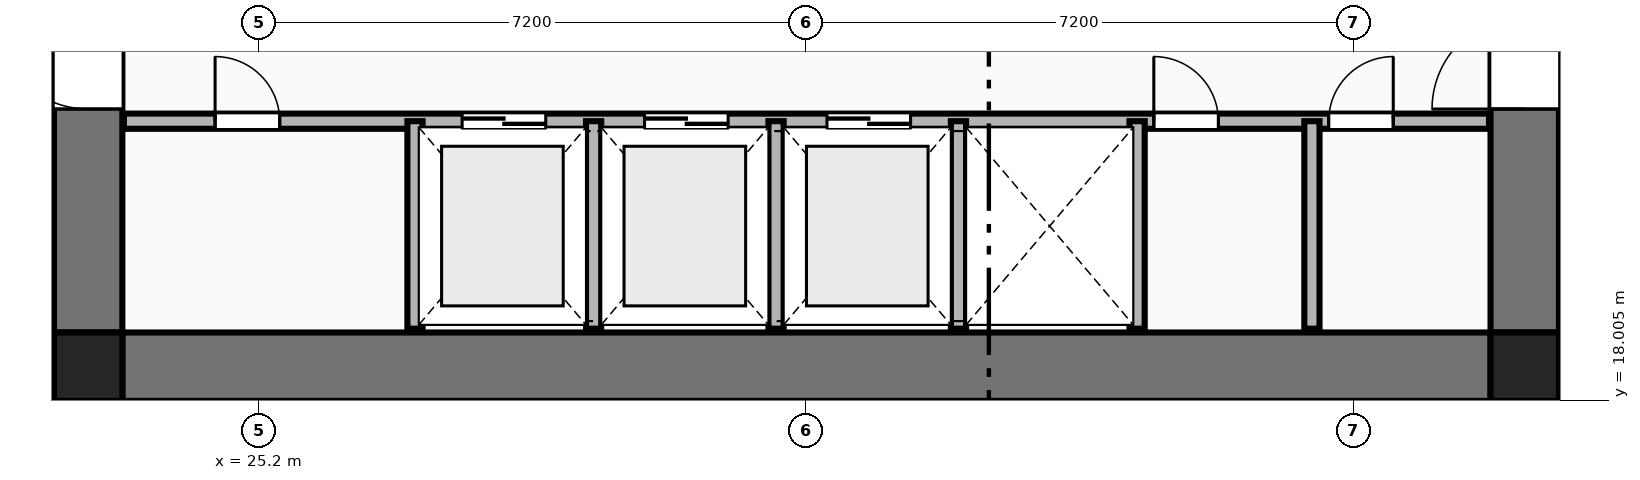
"""IFC4 building model, lengths in metres.
Left out: names, types, materials, properties, quantities, classifications, styles, units other than length and angle.
Written with IfcOpenShell. Run it as: python <this file> out.ifc"""

import sys

from ifc_helpers import new_model, si_unit, direction, frame, frame_2d, origin, origin_2d, place, context, subcontext, project, spatial, rectangle, extrude, element, fill, save


model = new_model("IFC4")
c1 = context("Model", 3, precision=1e-05, world=origin(), true_north=direction((0.0, 1.0)))
c2 = subcontext(c1, "Body", "Model", "MODEL_VIEW")
j1 = project(units=[si_unit("LENGTHUNIT", "METRE"), si_unit("PLANEANGLEUNIT", "RADIAN")], contexts=[c1])
p1 = place(None, origin())
s1 = spatial("IfcSite", under=j1, at=p1, CompositionType="ELEMENT")
p2 = place(p1, origin())
s2 = spatial("IfcBuilding", under=s1, at=p2, CompositionType="ELEMENT")
p3 = place(p2, frame((0.0, 0.0, 28.45)))
s3 = spatial("IfcBuildingStorey", under=s2, at=p3, CompositionType="ELEMENT", Elevation=28.45)
for number, where, z_axis, x_axis in (
    (1, (22.95, 18.45, 0.0), (0.0, 0.0, 1.0), (1.0, 0.0, 0.0)),
    (2, (41.85, 18.45, 0.0), (0.0, 0.0, 1.0), (1.0, 0.0, 0.0)),
):
    element("IfcColumn", number, at=place(p3, frame(where, z_axis=z_axis, x_axis=x_axis)), inside=s3, PredefinedType="COLUMN", context=c2, shape_type="SweptSolid", body=[
        extrude(rectangle(XDim=0.9, YDim=0.9, at=origin_2d()), origin(), (0.0, 0.0, 1.0), 3.55),
    ])
p4 = place(p3, frame((23.4, 18.45, 0.0), z_axis=(0.0, 0.0, 1.0), x_axis=(1.0, 0.0, 0.0)))
e3 = element("IfcWall", 3, at=p4, inside=s3, PredefinedType="SHEAR", context=c2, shape_type="SweptSolid", body=[
    extrude(rectangle(XDim=18.0, YDim=0.9, at=frame_2d((9.0, 0.0))), origin(), (0.0, 0.0, 1.0), 3.33),
])
p5 = place(p3, frame((22.95, 18.9, 0.0), z_axis=(0.0, 0.0, 1.0), x_axis=(0.0, 1.0, 0.0)))
e4 = element("IfcWall", 4, at=p5, inside=s3, PredefinedType="SHEAR", context=c2, shape_type="SweptSolid", body=[
    extrude(rectangle(XDim=14.0, YDim=0.9, at=frame_2d((7.0, 0.0))), origin(), (0.0, 0.0, 1.0), 3.33),
])
p6 = place(p5, frame((2.94, 0.0, 0.0)))
e5 = element("IfcOpeningElement", 5, at=p6, cuts=e4, PredefinedType="OPENING", context=c2, shape_type="SweptSolid", body=[
    extrude(rectangle(XDim=1.22, YDim=2.25, at=frame_2d((0.61, 1.125))), frame((0.0, 0.46, 0.0), z_axis=(0.0, -1.0, 0.0), x_axis=(1.0, 0.0, 0.0)), (0.0, 0.0, 1.0), 0.92),
])
p7 = place(p3, frame((41.85, 18.9, 0.0), z_axis=(0.0, 0.0, 1.0), x_axis=(0.0, 1.0, 0.0)))
e6 = element("IfcWall", 6, at=p7, inside=s3, PredefinedType="SHEAR", context=c2, shape_type="SweptSolid", body=[
    extrude(rectangle(XDim=14.0, YDim=0.9, at=frame_2d((7.0, 0.0))), origin(), (0.0, 0.0, 1.0), 3.33),
])
p8 = place(p7, frame((2.94, 0.0, 0.0)))
e7 = element("IfcOpeningElement", 7, at=p8, cuts=e6, PredefinedType="OPENING", context=c2, shape_type="SweptSolid", body=[
    extrude(rectangle(XDim=1.22, YDim=2.25, at=frame_2d((0.61, 1.125))), frame((0.0, 0.46, 0.0), z_axis=(0.0, -1.0, 0.0), x_axis=(1.0, 0.0, 0.0)), (0.0, 0.0, 1.0), 0.92),
])
p9 = place(p3, frame((23.42, 21.68, 0.0), z_axis=(0.0, 0.0, 1.0), x_axis=(1.0, 0.0, 0.0)))
e8 = element("IfcWall", 8, at=p9, inside=s3, PredefinedType="PLUMBINGWALL", context=c2, shape_type="SweptSolid", body=[
    extrude(rectangle(XDim=17.96, YDim=0.2, at=frame_2d((8.98, 0.0))), origin(), (0.0, 0.0, 1.0), 3.33),
])
p10 = place(p9, frame((4.45, 0.0, 0.0)))
e9 = element("IfcOpeningElement", 9, at=p10, cuts=e8, PredefinedType="OPENING", context=c2, shape_type="SweptSolid", body=[
    extrude(rectangle(XDim=1.1, YDim=2.2, at=frame_2d((0.55, 1.1))), frame((0.0, 0.11, 0.0), z_axis=(0.0, -1.0, 0.0), x_axis=(1.0, 0.0, 0.0)), (0.0, 0.0, 1.0), 0.22),
])
p11 = place(p9, frame((6.85, 0.0, 0.0)))
e10 = element("IfcOpeningElement", 10, at=p11, cuts=e8, PredefinedType="OPENING", context=c2, shape_type="SweptSolid", body=[
    extrude(rectangle(XDim=1.1, YDim=2.2, at=frame_2d((0.55, 1.1))), frame((0.0, 0.11, 0.0), z_axis=(0.0, -1.0, 0.0), x_axis=(1.0, 0.0, 0.0)), (0.0, 0.0, 1.0), 0.22),
])
p12 = place(p9, frame((9.25, 0.0, 0.0)))
e11 = element("IfcOpeningElement", 11, at=p12, cuts=e8, PredefinedType="OPENING", context=c2, shape_type="SweptSolid", body=[
    extrude(rectangle(XDim=1.1, YDim=2.2, at=frame_2d((0.55, 1.1))), frame((0.0, 0.11, 0.0), z_axis=(0.0, -1.0, 0.0), x_axis=(1.0, 0.0, 0.0)), (0.0, 0.0, 1.0), 0.22),
])
p13 = place(p9, frame((1.2, 0.0, 0.0)))
e12 = element("IfcOpeningElement", 12, at=p13, cuts=e8, PredefinedType="OPENING", context=c2, shape_type="SweptSolid", body=[
    extrude(rectangle(XDim=0.85, YDim=2.05, at=frame_2d((0.425, 1.025))), frame((0.0, 0.11, 0.0), z_axis=(0.0, -1.0, 0.0), x_axis=(1.0, 0.0, 0.0)), (0.0, 0.0, 1.0), 0.22),
])
p14 = place(p9, frame((13.55, 0.0, 0.0)))
e13 = element("IfcOpeningElement", 13, at=p14, cuts=e8, PredefinedType="OPENING", context=c2, shape_type="SweptSolid", body=[
    extrude(rectangle(XDim=0.85, YDim=2.05, at=frame_2d((0.425, 1.025))), frame((0.0, 0.11, 0.0), z_axis=(0.0, -1.0, 0.0), x_axis=(1.0, 0.0, 0.0)), (0.0, 0.0, 1.0), 0.22),
])
p15 = place(p9, frame((15.85, 0.0, 0.0)))
e14 = element("IfcOpeningElement", 14, at=p15, cuts=e8, PredefinedType="OPENING", context=c2, shape_type="SweptSolid", body=[
    extrude(rectangle(XDim=0.85, YDim=2.05, at=frame_2d((0.425, 1.025))), frame((0.0, 0.11, 0.0), z_axis=(0.0, -1.0, 0.0), x_axis=(1.0, 0.0, 0.0)), (0.0, 0.0, 1.0), 0.22),
])
for number, where, z_axis, x_axis in (
    (15, (27.25, 18.95, 0.0), (0.0, 0.0, 1.0), (0.0, 1.0, 0.0)),
    (16, (29.6, 18.95, 0.0), (0.0, 0.0, 1.0), (0.0, 1.0, 0.0)),
    (17, (32.0, 18.95, 0.0), (0.0, 0.0, 1.0), (0.0, 1.0, 0.0)),
    (18, (34.4, 18.95, 0.0), (0.0, 0.0, 1.0), (0.0, 1.0, 0.0)),
    (19, (36.75, 18.95, 0.0), (0.0, 0.0, 1.0), (0.0, 1.0, 0.0)),
    (20, (39.05, 18.95, 0.0), (0.0, 0.0, 1.0), (0.0, 1.0, 0.0)),
):
    element("IfcWall", number, at=place(p3, frame(where, z_axis=z_axis, x_axis=x_axis)), inside=s3, PredefinedType="PLUMBINGWALL", context=c2, shape_type="SweptSolid", body=[
        extrude(rectangle(XDim=2.73, YDim=0.2, at=frame_2d((1.365, 0.0))), origin(), (0.0, 0.0, 1.0), 3.33),
    ])
p16 = place(p6, origin())
e21 = element("IfcDoor", 21, at=p16, inside=s3, OperationType="SINGLE_SWING_RIGHT", PredefinedType="DOOR", context=c2, shape_type="SweptSolid", body=[
    extrude(rectangle(XDim=1.22, YDim=2.25, at=frame_2d((0.61, 1.125))), frame((0.0, 0.025, 0.0), z_axis=(0.0, -1.0, 0.0), x_axis=(1.0, 0.0, 0.0)), (0.0, 0.0, 1.0), 0.05),
])
fill(e5, e21)
p17 = place(p8, origin())
e22 = element("IfcDoor", 22, at=p17, inside=s3, OperationType="SINGLE_SWING_LEFT", PredefinedType="DOOR", context=c2, shape_type="SweptSolid", body=[
    extrude(rectangle(XDim=1.22, YDim=2.25, at=frame_2d((0.61, 1.125))), frame((0.0, 0.025, 0.0), z_axis=(0.0, -1.0, 0.0), x_axis=(1.0, 0.0, 0.0)), (0.0, 0.0, 1.0), 0.05),
])
fill(e7, e22)
p18 = place(p10, origin())
e23 = element("IfcDoor", 23, at=p18, inside=s3, OperationType="DOUBLE_DOOR_SLIDING", PredefinedType="DOOR", context=c2, shape_type="SweptSolid", body=[
    extrude(rectangle(XDim=1.1, YDim=2.2, at=frame_2d((0.55, 1.1))), frame((0.0, 0.025, 0.0), z_axis=(0.0, -1.0, 0.0), x_axis=(1.0, 0.0, 0.0)), (0.0, 0.0, 1.0), 0.05),
])
fill(e9, e23)
p19 = place(p11, origin())
e24 = element("IfcDoor", 24, at=p19, inside=s3, OperationType="DOUBLE_DOOR_SLIDING", PredefinedType="DOOR", context=c2, shape_type="SweptSolid", body=[
    extrude(rectangle(XDim=1.1, YDim=2.2, at=frame_2d((0.55, 1.1))), frame((0.0, 0.025, 0.0), z_axis=(0.0, -1.0, 0.0), x_axis=(1.0, 0.0, 0.0)), (0.0, 0.0, 1.0), 0.05),
])
fill(e10, e24)
p20 = place(p12, origin())
e25 = element("IfcDoor", 25, at=p20, inside=s3, OperationType="DOUBLE_DOOR_SLIDING", PredefinedType="DOOR", context=c2, shape_type="SweptSolid", body=[
    extrude(rectangle(XDim=1.1, YDim=2.2, at=frame_2d((0.55, 1.1))), frame((0.0, 0.025, 0.0), z_axis=(0.0, -1.0, 0.0), x_axis=(1.0, 0.0, 0.0)), (0.0, 0.0, 1.0), 0.05),
])
fill(e11, e25)
p21 = place(p13, origin())
e26 = element("IfcDoor", 26, at=p21, inside=s3, OperationType="SINGLE_SWING_LEFT", PredefinedType="DOOR", context=c2, shape_type="SweptSolid", body=[
    extrude(rectangle(XDim=0.85, YDim=2.05, at=frame_2d((0.425, 1.025))), frame((0.0, 0.025, 0.0), z_axis=(0.0, -1.0, 0.0), x_axis=(1.0, 0.0, 0.0)), (0.0, 0.0, 1.0), 0.05),
])
fill(e12, e26)
p22 = place(p14, origin())
e27 = element("IfcDoor", 27, at=p22, inside=s3, OperationType="SINGLE_SWING_LEFT", PredefinedType="DOOR", context=c2, shape_type="SweptSolid", body=[
    extrude(rectangle(XDim=0.85, YDim=2.05, at=frame_2d((0.425, 1.025))), frame((0.0, 0.025, 0.0), z_axis=(0.0, -1.0, 0.0), x_axis=(1.0, 0.0, 0.0)), (0.0, 0.0, 1.0), 0.05),
])
fill(e13, e27)
p23 = place(p15, origin())
e28 = element("IfcDoor", 28, at=p23, inside=s3, OperationType="SINGLE_SWING_RIGHT", PredefinedType="DOOR", context=c2, shape_type="SweptSolid", body=[
    extrude(rectangle(XDim=0.85, YDim=2.05, at=frame_2d((0.425, 1.025))), frame((0.0, 0.025, 0.0), z_axis=(0.0, -1.0, 0.0), x_axis=(1.0, 0.0, 0.0)), (0.0, 0.0, 1.0), 0.05),
])
fill(e14, e28)
save(model, sys.argv[1])
